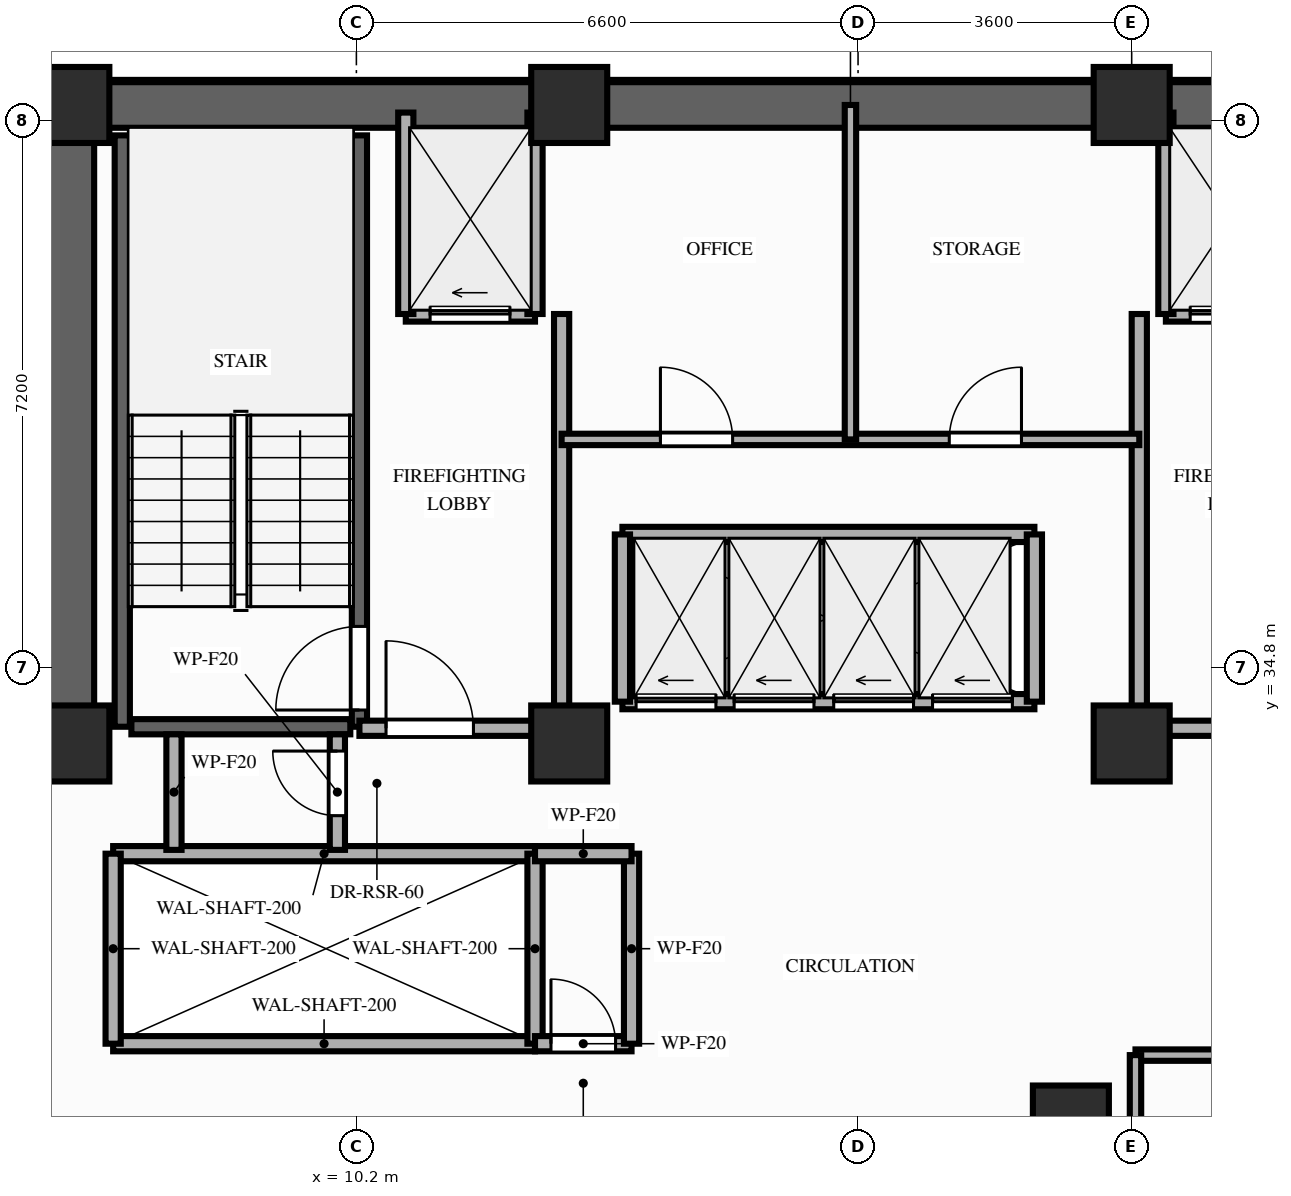
"""IFC4 building model, lengths in metres.
Left out: names, types, materials, properties, quantities, classifications, styles, units other than length and angle.
Written with IfcOpenShell. Run it as: python <this file> out.ifc"""

import sys

from ifc_helpers import new_model, si_unit, direction, frame, frame_2d, origin, origin_2d, place, context, subcontext, project, spatial, rectangle, extrude, element, fill, save


model = new_model("IFC4")
c1 = context("Model", 3, precision=1e-05, world=origin(), true_north=direction((0.0, 1.0)))
c2 = subcontext(c1, "Body", "Model", "MODEL_VIEW")
j1 = project(units=[si_unit("LENGTHUNIT", "METRE"), si_unit("PLANEANGLEUNIT", "RADIAN")], contexts=[c1])
p1 = place(None, origin())
s1 = spatial("IfcSite", under=j1, at=p1, CompositionType="ELEMENT")
p2 = place(p1, origin())
s2 = spatial("IfcBuilding", under=s1, at=p2, CompositionType="ELEMENT")
p3 = place(p2, frame((0.0, 0.0, 149.0)))
s3 = spatial("IfcBuildingStorey", under=s2, at=p3, CompositionType="ELEMENT", Elevation=149.0)
for number, where, z_axis, x_axis in (
    (1, (6.45, 33.8, 0.0), (0.0, 0.0, 1.0), (1.0, 0.0, 0.0)),
    (2, (13.0, 33.8, 0.0), (0.0, 0.0, 1.0), (1.0, 0.0, 0.0)),
    (3, (20.4, 33.8, 0.0), (0.0, 0.0, 1.0), (1.0, 0.0, 0.0)),
    (4, (6.45, 42.2, 0.0), (0.0, 0.0, 1.0), (1.0, 0.0, 0.0)),
    (5, (13.0, 42.2, 0.0), (0.0, 0.0, 1.0), (1.0, 0.0, 0.0)),
    (6, (20.4, 42.2, 0.0), (0.0, 0.0, 1.0), (1.0, 0.0, 0.0)),
    (7, (19.6, 28.8, 0.0), (0.0, 0.0, 1.0), (1.0, 0.0, 0.0)),
):
    element("IfcColumn", number, at=place(p3, frame(where, z_axis=z_axis, x_axis=x_axis)), inside=s3, PredefinedType="COLUMN", context=c2, shape_type="SweptSolid", body=[
        extrude(rectangle(XDim=1.0, YDim=1.0, at=origin_2d()), origin(), (0.0, 0.0, 1.0), 3.2),
    ])
p4 = place(p3, frame((6.45, 42.2, 0.0), z_axis=(0.0, 0.0, 1.0), x_axis=(1.0, 0.0, 0.0)))
e8 = element("IfcWall", 8, at=p4, inside=s3, PredefinedType="SHEAR", context=c2, shape_type="SweptSolid", body=[
    extrude(rectangle(XDim=20.45, YDim=0.6, at=frame_2d((10.225, 0.0))), origin(), (0.0, 0.0, 1.0), 2.96),
])
p5 = place(p3, frame((6.45, 33.8, 0.0), z_axis=(0.0, 0.0, 1.0), x_axis=(0.0, 1.0, 0.0)))
e9 = element("IfcWall", 9, at=p5, inside=s3, PredefinedType="SHEAR", context=c2, shape_type="SweptSolid", body=[
    extrude(rectangle(XDim=7.95, YDim=0.6, at=frame_2d((3.975, 0.0))), origin(), (0.0, 0.0, 1.0), 2.96),
])
p6 = place(p3, frame((7.12, 34.02, 0.0), z_axis=(0.0, 0.0, 1.0), x_axis=(0.0, 1.0, 0.0)))
e10 = element("IfcWall", 10, at=p6, inside=s3, PredefinedType="SHEAR", context=c2, shape_type="SweptSolid", body=[
    extrude(rectangle(XDim=7.78, YDim=0.2, at=frame_2d((3.89, 0.0))), origin(), (0.0, 0.0, 1.0), 2.96),
])
p7 = place(p3, frame((10.24, 34.02, 0.0), z_axis=(0.0, 0.0, 1.0), x_axis=(0.0, 1.0, 0.0)))
e11 = element("IfcWall", 11, at=p7, inside=s3, PredefinedType="SHEAR", context=c2, shape_type="SweptSolid", body=[
    extrude(rectangle(XDim=7.78, YDim=0.2, at=frame_2d((3.89, 0.0))), origin(), (0.0, 0.0, 1.0), 2.96),
])
p8 = place(p7, frame((0.22, 0.0, 0.0)))
e12 = element("IfcOpeningElement", 12, at=p8, cuts=e11, PredefinedType="OPENING", context=c2, shape_type="SweptSolid", body=[
    extrude(rectangle(XDim=1.1, YDim=2.15, at=frame_2d((0.55, 1.075))), frame((0.0, 0.11, 0.0), z_axis=(0.0, -1.0, 0.0), x_axis=(1.0, 0.0, 0.0)), (0.0, 0.0, 1.0), 0.22),
])
p9 = place(p3, frame((7.24, 34.02, 0.0), z_axis=(0.0, 0.0, 1.0), x_axis=(1.0, 0.0, 0.0)))
e13 = element("IfcWall", 13, at=p9, inside=s3, PredefinedType="SHEAR", context=c2, shape_type="SweptSolid", body=[
    extrude(rectangle(XDim=2.88, YDim=0.2, at=frame_2d((1.44, 0.0))), origin(), (0.0, 0.0, 1.0), 2.96),
])
for number, where, z_axis, x_axis in (
    (14, (7.0, 29.85, 0.0), (0.0, 0.0, 1.0), (1.0, 0.0, 0.0)),
    (15, (7.0, 32.35, 0.0), (0.0, 0.0, 1.0), (1.0, 0.0, 0.0)),
):
    element("IfcWall", number, at=place(p3, frame(where, z_axis=z_axis, x_axis=x_axis)), inside=s3, PredefinedType="MOVABLE", context=c2, shape_type="SweptSolid", body=[
        extrude(rectangle(XDim=5.55, YDim=0.2, at=frame_2d((2.775, 0.0))), origin(), (0.0, 0.0, 1.0), 2.96),
    ])
for number, where, z_axis, x_axis in (
    (16, (7.0, 29.85, 0.0), (0.0, 0.0, 1.0), (0.0, 1.0, 0.0)),
    (17, (12.55, 29.85, 0.0), (0.0, 0.0, 1.0), (0.0, 1.0, 0.0)),
):
    element("IfcWall", number, at=place(p3, frame(where, z_axis=z_axis, x_axis=x_axis)), inside=s3, PredefinedType="MOVABLE", context=c2, shape_type="SweptSolid", body=[
        extrude(rectangle(XDim=2.5, YDim=0.2, at=frame_2d((1.25, 0.0))), origin(), (0.0, 0.0, 1.0), 2.96),
    ])
p10 = place(p3, frame((10.85, 39.45, 0.0), z_axis=(0.0, 0.0, 1.0), x_axis=(1.0, 0.0, 0.0)))
e18 = element("IfcWall", 18, at=p10, inside=s3, PredefinedType="MOVABLE", context=c2, shape_type="SweptSolid", body=[
    extrude(rectangle(XDim=1.7, YDim=0.2, at=frame_2d((0.85, 0.0))), origin(), (0.0, 0.0, 1.0), 2.96),
])
p11 = place(p10, frame((0.32, 0.0, 0.0)))
e19 = element("IfcOpeningElement", 19, at=p11, cuts=e18, PredefinedType="OPENING", context=c2, shape_type="SweptSolid", body=[
    extrude(rectangle(XDim=1.05, YDim=2.15, at=frame_2d((0.525, 1.075))), frame((0.0, 0.11, 0.0), z_axis=(0.0, -1.0, 0.0), x_axis=(1.0, 0.0, 0.0)), (0.0, 0.0, 1.0), 0.22),
])
p12 = place(p3, frame((20.85, 39.45, 0.0), z_axis=(0.0, 0.0, 1.0), x_axis=(1.0, 0.0, 0.0)))
e20 = element("IfcWall", 20, at=p12, inside=s3, PredefinedType="MOVABLE", context=c2, shape_type="SweptSolid", body=[
    extrude(rectangle(XDim=1.7, YDim=0.2, at=frame_2d((0.85, 0.0))), origin(), (0.0, 0.0, 1.0), 2.96),
])
p13 = place(p12, frame((0.32, 0.0, 0.0)))
e21 = element("IfcOpeningElement", 21, at=p13, cuts=e20, PredefinedType="OPENING", context=c2, shape_type="SweptSolid", body=[
    extrude(rectangle(XDim=1.05, YDim=2.15, at=frame_2d((0.525, 1.075))), frame((0.0, 0.11, 0.0), z_axis=(0.0, -1.0, 0.0), x_axis=(1.0, 0.0, 0.0)), (0.0, 0.0, 1.0), 0.22),
])
for number, where, z_axis, x_axis in (
    (22, (10.85, 39.45, 0.0), (0.0, 0.0, 1.0), (0.0, 1.0, 0.0)),
    (23, (12.55, 39.45, 0.0), (0.0, 0.0, 1.0), (0.0, 1.0, 0.0)),
):
    element("IfcWall", number, at=place(p3, frame(where, z_axis=z_axis, x_axis=x_axis)), inside=s3, PredefinedType="MOVABLE", context=c2, shape_type="SweptSolid", body=[
        extrude(rectangle(XDim=2.65, YDim=0.2, at=frame_2d((1.325, 0.0))), origin(), (0.0, 0.0, 1.0), 2.4),
    ])
p14 = place(p3, frame((12.9, 34.0, 0.0), z_axis=(0.0, 0.0, 1.0), x_axis=(0.0, 1.0, 0.0)))
e24 = element("IfcWall", 24, at=p14, inside=s3, PredefinedType="PARTITIONING", context=c2, shape_type="SweptSolid", body=[
    extrude(rectangle(XDim=5.45, YDim=0.2, at=frame_2d((2.725, 0.0))), origin(), (0.0, 0.0, 1.0), 2.4),
])
p15 = place(p3, frame((10.24, 34.0, 0.0), z_axis=(0.0, 0.0, 1.0), x_axis=(1.0, 0.0, 0.0)))
e25 = element("IfcWall", 25, at=p15, inside=s3, PredefinedType="PARTITIONING", context=c2, shape_type="SweptSolid", body=[
    extrude(rectangle(XDim=2.66, YDim=0.2, at=frame_2d((1.33, 0.0))), origin(), (0.0, 0.0, 1.0), 2.4),
])
p16 = place(p15, frame((0.35, 0.0, 0.0)))
e26 = element("IfcOpeningElement", 26, at=p16, cuts=e25, PredefinedType="OPENING", context=c2, shape_type="SweptSolid", body=[
    extrude(rectangle(XDim=1.15, YDim=2.15, at=frame_2d((0.575, 1.075))), frame((0.0, 0.11, 0.0), z_axis=(0.0, -1.0, 0.0), x_axis=(1.0, 0.0, 0.0)), (0.0, 0.0, 1.0), 0.22),
])
p17 = place(p3, frame((20.85, 39.45, 0.0), z_axis=(0.0, 0.0, 1.0), x_axis=(0.0, 1.0, 0.0)))
e27 = element("IfcWall", 27, at=p17, inside=s3, PredefinedType="MOVABLE", context=c2, shape_type="SweptSolid", body=[
    extrude(rectangle(XDim=2.65, YDim=0.2, at=frame_2d((1.325, 0.0))), origin(), (0.0, 0.0, 1.0), 2.4),
])
p18 = place(p3, frame((20.5, 34.0, 0.0), z_axis=(0.0, 0.0, 1.0), x_axis=(0.0, 1.0, 0.0)))
e28 = element("IfcWall", 28, at=p18, inside=s3, PredefinedType="PARTITIONING", context=c2, shape_type="SweptSolid", body=[
    extrude(rectangle(XDim=5.45, YDim=0.2, at=frame_2d((2.725, 0.0))), origin(), (0.0, 0.0, 1.0), 2.4),
])
p19 = place(p3, frame((20.5, 34.0, 0.0), z_axis=(0.0, 0.0, 1.0), x_axis=(1.0, 0.0, 0.0)))
e29 = element("IfcWall", 29, at=p19, inside=s3, PredefinedType="PARTITIONING", context=c2, shape_type="SweptSolid", body=[
    extrude(rectangle(XDim=2.6, YDim=0.2, at=frame_2d((1.3, 0.0))), origin(), (0.0, 0.0, 1.0), 2.4),
])
p20 = place(p19, frame((1.05, 0.0, 0.0)))
e30 = element("IfcOpeningElement", 30, at=p20, cuts=e29, PredefinedType="OPENING", context=c2, shape_type="SweptSolid", body=[
    extrude(rectangle(XDim=1.15, YDim=2.15, at=frame_2d((0.575, 1.075))), frame((0.0, 0.11, 0.0), z_axis=(0.0, -1.0, 0.0), x_axis=(1.0, 0.0, 0.0)), (0.0, 0.0, 1.0), 0.22),
])
p21 = place(p3, frame((12.55, 29.85, 0.0), z_axis=(0.0, 0.0, 1.0), x_axis=(1.0, 0.0, 0.0)))
e31 = element("IfcWall", 31, at=p21, inside=s3, PredefinedType="PARTITIONING", context=c2, shape_type="SweptSolid", body=[
    extrude(rectangle(XDim=1.27, YDim=0.2, at=frame_2d((0.635, 0.0))), origin(), (0.0, 0.0, 1.0), 2.96),
])
p22 = place(p21, frame((0.21, 0.0, 0.0)))
e32 = element("IfcOpeningElement", 32, at=p22, cuts=e31, PredefinedType="OPENING", context=c2, shape_type="SweptSolid", body=[
    extrude(rectangle(XDim=0.85, YDim=2.05, at=frame_2d((0.425, 1.025))), frame((0.0, 0.11, 0.0), z_axis=(0.0, -1.0, 0.0), x_axis=(1.0, 0.0, 0.0)), (0.0, 0.0, 1.0), 0.22),
])
p23 = place(p3, frame((13.82, 29.85, 0.0), z_axis=(0.0, 0.0, 1.0), x_axis=(0.0, 1.0, 0.0)))
e33 = element("IfcWall", 33, at=p23, inside=s3, PredefinedType="PARTITIONING", context=c2, shape_type="SweptSolid", body=[
    extrude(rectangle(XDim=2.5, YDim=0.2, at=frame_2d((1.25, 0.0))), origin(), (0.0, 0.0, 1.0), 2.96),
])
p24 = place(p3, frame((12.55, 32.35, 0.0), z_axis=(0.0, 0.0, 1.0), x_axis=(1.0, 0.0, 0.0)))
e34 = element("IfcWall", 34, at=p24, inside=s3, PredefinedType="PARTITIONING", context=c2, shape_type="SweptSolid", body=[
    extrude(rectangle(XDim=1.27, YDim=0.2, at=frame_2d((0.635, 0.0))), origin(), (0.0, 0.0, 1.0), 2.96),
])
p25 = place(p3, frame((7.8, 32.4, 0.0), z_axis=(0.0, 0.0, 1.0), x_axis=(0.0, 1.0, 0.0)))
e35 = element("IfcWall", 35, at=p25, inside=s3, PredefinedType="PARTITIONING", context=c2, shape_type="SweptSolid", body=[
    extrude(rectangle(XDim=1.52, YDim=0.2, at=frame_2d((0.76, 0.0))), origin(), (0.0, 0.0, 1.0), 2.4),
])
p26 = place(p3, frame((9.95, 32.4, 0.0), z_axis=(0.0, 0.0, 1.0), x_axis=(0.0, 1.0, 0.0)))
e36 = element("IfcWall", 36, at=p26, inside=s3, PredefinedType="PARTITIONING", context=c2, shape_type="SweptSolid", body=[
    extrude(rectangle(XDim=1.52, YDim=0.2, at=frame_2d((0.76, 0.0))), origin(), (0.0, 0.0, 1.0), 2.4),
])
p27 = place(p26, frame((0.45, 0.0, 0.0)))
e37 = element("IfcOpeningElement", 37, at=p27, cuts=e36, PredefinedType="OPENING", context=c2, shape_type="SweptSolid", body=[
    extrude(rectangle(XDim=0.85, YDim=2.05, at=frame_2d((0.425, 1.025))), frame((0.0, 0.11, 0.0), z_axis=(0.0, -1.0, 0.0), x_axis=(1.0, 0.0, 0.0)), (0.0, 0.0, 1.0), 0.22),
])
p28 = place(p3, frame((12.9, 37.8, 0.0), z_axis=(0.0, 0.0, 1.0), x_axis=(1.0, 0.0, 0.0)))
e38 = element("IfcWall", 38, at=p28, inside=s3, PredefinedType="PARTITIONING", context=c2, shape_type="SweptSolid", body=[
    extrude(rectangle(XDim=7.6, YDim=0.15, at=frame_2d((3.8, 0.0))), origin(), (0.0, 0.0, 1.0), 2.96),
])
p29 = place(p28, frame((1.3, 0.0, 0.0)))
e39 = element("IfcOpeningElement", 39, at=p29, cuts=e38, PredefinedType="OPENING", context=c2, shape_type="SweptSolid", body=[
    extrude(rectangle(XDim=0.95, YDim=2.15, at=frame_2d((0.475, 1.075))), frame((0.0, 0.085, 0.0), z_axis=(0.0, -1.0, 0.0), x_axis=(1.0, 0.0, 0.0)), (0.0, 0.0, 1.0), 0.17),
])
p30 = place(p28, frame((5.1, 0.0, 0.0)))
e40 = element("IfcOpeningElement", 40, at=p30, cuts=e38, PredefinedType="OPENING", context=c2, shape_type="SweptSolid", body=[
    extrude(rectangle(XDim=0.95, YDim=2.15, at=frame_2d((0.475, 1.075))), frame((0.0, 0.085, 0.0), z_axis=(0.0, -1.0, 0.0), x_axis=(1.0, 0.0, 0.0)), (0.0, 0.0, 1.0), 0.17),
])
p31 = place(p3, frame((16.7, 37.8, 0.0), z_axis=(0.0, 0.0, 1.0), x_axis=(0.0, 1.0, 0.0)))
e41 = element("IfcWall", 41, at=p31, inside=s3, PredefinedType="PARTITIONING", context=c2, shape_type="SweptSolid", body=[
    extrude(rectangle(XDim=4.4, YDim=0.15, at=frame_2d((2.2, 0.0))), origin(), (0.0, 0.0, 1.0), 2.4),
])
p32 = place(p3, frame((13.7, 34.35, 0.0), z_axis=(0.0, 0.0, 1.0), x_axis=(1.0, 0.0, 0.0)))
e42 = element("IfcWall", 42, at=p32, inside=s3, PredefinedType="MOVABLE", context=c2, shape_type="SweptSolid", body=[
    extrude(rectangle(XDim=5.42, YDim=0.2, at=frame_2d((2.71, 0.0))), origin(), (0.0, 0.0, 1.0), 2.96),
])
p33 = place(p32, frame((0.18, 0.0, 0.0)))
e43 = element("IfcOpeningElement", 43, at=p33, cuts=e42, PredefinedType="OPENING", context=c2, shape_type="SweptSolid", body=[
    extrude(rectangle(XDim=1.05, YDim=2.15, at=frame_2d((0.525, 1.075))), frame((0.0, 0.11, 0.0), z_axis=(0.0, -1.0, 0.0), x_axis=(1.0, 0.0, 0.0)), (0.0, 0.0, 1.0), 0.22),
])
p34 = place(p32, frame((1.47, 0.0, 0.0)))
e44 = element("IfcOpeningElement", 44, at=p34, cuts=e42, PredefinedType="OPENING", context=c2, shape_type="SweptSolid", body=[
    extrude(rectangle(XDim=1.05, YDim=2.15, at=frame_2d((0.525, 1.075))), frame((0.0, 0.11, 0.0), z_axis=(0.0, -1.0, 0.0), x_axis=(1.0, 0.0, 0.0)), (0.0, 0.0, 1.0), 0.22),
])
p35 = place(p32, frame((2.78, 0.0, 0.0)))
e45 = element("IfcOpeningElement", 45, at=p35, cuts=e42, PredefinedType="OPENING", context=c2, shape_type="SweptSolid", body=[
    extrude(rectangle(XDim=1.05, YDim=2.15, at=frame_2d((0.525, 1.075))), frame((0.0, 0.11, 0.0), z_axis=(0.0, -1.0, 0.0), x_axis=(1.0, 0.0, 0.0)), (0.0, 0.0, 1.0), 0.22),
])
p36 = place(p32, frame((4.08, 0.0, 0.0)))
e46 = element("IfcOpeningElement", 46, at=p36, cuts=e42, PredefinedType="OPENING", context=c2, shape_type="SweptSolid", body=[
    extrude(rectangle(XDim=1.05, YDim=2.15, at=frame_2d((0.525, 1.075))), frame((0.0, 0.11, 0.0), z_axis=(0.0, -1.0, 0.0), x_axis=(1.0, 0.0, 0.0)), (0.0, 0.0, 1.0), 0.22),
])
p37 = place(p3, frame((13.7, 36.55, 0.0), z_axis=(0.0, 0.0, 1.0), x_axis=(1.0, 0.0, 0.0)))
e47 = element("IfcWall", 47, at=p37, inside=s3, PredefinedType="MOVABLE", context=c2, shape_type="SweptSolid", body=[
    extrude(rectangle(XDim=5.42, YDim=0.2, at=frame_2d((2.71, 0.0))), origin(), (0.0, 0.0, 1.0), 2.96),
])
for number, where, z_axis, x_axis in (
    (48, (13.7, 34.35, 0.0), (0.0, 0.0, 1.0), (0.0, 1.0, 0.0)),
    (49, (19.12, 34.35, 0.0), (0.0, 0.0, 1.0), (0.0, 1.0, 0.0)),
):
    element("IfcWall", number, at=place(p3, frame(where, z_axis=z_axis, x_axis=x_axis)), inside=s3, PredefinedType="MOVABLE", context=c2, shape_type="SweptSolid", body=[
        extrude(rectangle(XDim=2.2, YDim=0.2, at=frame_2d((1.1, 0.0))), origin(), (0.0, 0.0, 1.0), 2.96),
    ])
p38 = place(p3, frame((20.45, 29.7, 0.0), z_axis=(0.0, 0.0, 1.0), x_axis=(1.0, 0.0, 0.0)))
e50 = element("IfcWall", 50, at=p38, inside=s3, PredefinedType="PARTITIONING", context=c2, shape_type="SweptSolid", body=[
    extrude(rectangle(XDim=6.7, YDim=0.15, at=frame_2d((3.35, 0.0))), origin(), (0.0, 0.0, 1.0), 2.96),
])
p39 = place(p38, frame((2.8, 0.0, 0.0)))
e51 = element("IfcOpeningElement", 51, at=p39, cuts=e50, PredefinedType="OPENING", context=c2, shape_type="SweptSolid", body=[
    extrude(rectangle(XDim=0.95, YDim=2.15, at=frame_2d((0.475, 1.075))), frame((0.0, 0.085, 0.0), z_axis=(0.0, -1.0, 0.0), x_axis=(1.0, 0.0, 0.0)), (0.0, 0.0, 1.0), 0.17),
])
p40 = place(p3, frame((20.45, 26.75, 0.0), z_axis=(0.0, 0.0, 1.0), x_axis=(0.0, 1.0, 0.0)))
e52 = element("IfcWall", 52, at=p40, inside=s3, PredefinedType="PARTITIONING", context=c2, shape_type="SweptSolid", body=[
    extrude(rectangle(XDim=2.95, YDim=0.15, at=frame_2d((1.475, 0.0))), origin(), (0.0, 0.0, 1.0), 2.4),
])
p41 = place(p8, origin())
e53 = element("IfcDoor", 53, at=p41, inside=s3, OperationType="SINGLE_SWING_LEFT", PredefinedType="DOOR", context=c2, shape_type="SweptSolid", body=[
    extrude(rectangle(XDim=1.1, YDim=2.15, at=frame_2d((0.55, 1.075))), frame((0.0, 0.025, 0.0), z_axis=(0.0, -1.0, 0.0), x_axis=(1.0, 0.0, 0.0)), (0.0, 0.0, 1.0), 0.05),
])
fill(e12, e53)
p42 = place(p11, origin())
e54 = element("IfcDoor", 54, at=p42, inside=s3, OperationType="SLIDING_TO_LEFT", PredefinedType="DOOR", context=c2, shape_type="SweptSolid", body=[
    extrude(rectangle(XDim=1.05, YDim=2.15, at=frame_2d((0.525, 1.075))), frame((0.0, 0.025, 0.0), z_axis=(0.0, -1.0, 0.0), x_axis=(1.0, 0.0, 0.0)), (0.0, 0.0, 1.0), 0.05),
])
fill(e19, e54)
p43 = place(p13, origin())
e55 = element("IfcDoor", 55, at=p43, inside=s3, OperationType="SLIDING_TO_LEFT", PredefinedType="DOOR", context=c2, shape_type="SweptSolid", body=[
    extrude(rectangle(XDim=1.05, YDim=2.15, at=frame_2d((0.525, 1.075))), frame((0.0, 0.025, 0.0), z_axis=(0.0, -1.0, 0.0), x_axis=(1.0, 0.0, 0.0)), (0.0, 0.0, 1.0), 0.05),
])
fill(e21, e55)
p44 = place(p16, origin())
e56 = element("IfcDoor", 56, at=p44, inside=s3, OperationType="SINGLE_SWING_LEFT", PredefinedType="DOOR", context=c2, shape_type="SweptSolid", body=[
    extrude(rectangle(XDim=1.15, YDim=2.15, at=frame_2d((0.575, 1.075))), frame((0.0, 0.025, 0.0), z_axis=(0.0, -1.0, 0.0), x_axis=(1.0, 0.0, 0.0)), (0.0, 0.0, 1.0), 0.05),
])
fill(e26, e56)
p45 = place(p22, origin())
e57 = element("IfcDoor", 57, at=p45, inside=s3, OperationType="SINGLE_SWING_LEFT", PredefinedType="DOOR", context=c2, shape_type="SweptSolid", body=[
    extrude(rectangle(XDim=0.85, YDim=2.05, at=frame_2d((0.425, 1.025))), frame((0.0, 0.025, 0.0), z_axis=(0.0, -1.0, 0.0), x_axis=(1.0, 0.0, 0.0)), (0.0, 0.0, 1.0), 0.05),
])
fill(e32, e57)
p46 = place(p27, origin())
e58 = element("IfcDoor", 58, at=p46, inside=s3, OperationType="SINGLE_SWING_RIGHT", PredefinedType="DOOR", context=c2, shape_type="SweptSolid", body=[
    extrude(rectangle(XDim=0.85, YDim=2.05, at=frame_2d((0.425, 1.025))), frame((0.0, 0.025, 0.0), z_axis=(0.0, -1.0, 0.0), x_axis=(1.0, 0.0, 0.0)), (0.0, 0.0, 1.0), 0.05),
])
fill(e37, e58)
p47 = place(p29, origin())
e59 = element("IfcDoor", 59, at=p47, inside=s3, OperationType="SINGLE_SWING_LEFT", PredefinedType="DOOR", context=c2, shape_type="SweptSolid", body=[
    extrude(rectangle(XDim=0.95, YDim=2.15, at=frame_2d((0.475, 1.075))), frame((0.0, 0.025, 0.0), z_axis=(0.0, -1.0, 0.0), x_axis=(1.0, 0.0, 0.0)), (0.0, 0.0, 1.0), 0.05),
])
fill(e39, e59)
p48 = place(p30, origin())
e60 = element("IfcDoor", 60, at=p48, inside=s3, OperationType="SINGLE_SWING_RIGHT", PredefinedType="DOOR", context=c2, shape_type="SweptSolid", body=[
    extrude(rectangle(XDim=0.95, YDim=2.15, at=frame_2d((0.475, 1.075))), frame((0.0, 0.025, 0.0), z_axis=(0.0, -1.0, 0.0), x_axis=(1.0, 0.0, 0.0)), (0.0, 0.0, 1.0), 0.05),
])
fill(e40, e60)
p49 = place(p33, origin())
e61 = element("IfcDoor", 61, at=p49, inside=s3, OperationType="SLIDING_TO_LEFT", PredefinedType="DOOR", context=c2, shape_type="SweptSolid", body=[
    extrude(rectangle(XDim=1.05, YDim=2.15, at=frame_2d((0.525, 1.075))), frame((0.0, 0.025, 0.0), z_axis=(0.0, -1.0, 0.0), x_axis=(1.0, 0.0, 0.0)), (0.0, 0.0, 1.0), 0.05),
])
fill(e43, e61)
p50 = place(p34, origin())
e62 = element("IfcDoor", 62, at=p50, inside=s3, OperationType="SLIDING_TO_LEFT", PredefinedType="DOOR", context=c2, shape_type="SweptSolid", body=[
    extrude(rectangle(XDim=1.05, YDim=2.15, at=frame_2d((0.525, 1.075))), frame((0.0, 0.025, 0.0), z_axis=(0.0, -1.0, 0.0), x_axis=(1.0, 0.0, 0.0)), (0.0, 0.0, 1.0), 0.05),
])
fill(e44, e62)
p51 = place(p35, origin())
e63 = element("IfcDoor", 63, at=p51, inside=s3, OperationType="SLIDING_TO_LEFT", PredefinedType="DOOR", context=c2, shape_type="SweptSolid", body=[
    extrude(rectangle(XDim=1.05, YDim=2.15, at=frame_2d((0.525, 1.075))), frame((0.0, 0.025, 0.0), z_axis=(0.0, -1.0, 0.0), x_axis=(1.0, 0.0, 0.0)), (0.0, 0.0, 1.0), 0.05),
])
fill(e45, e63)
p52 = place(p36, origin())
e64 = element("IfcDoor", 64, at=p52, inside=s3, OperationType="SLIDING_TO_LEFT", PredefinedType="DOOR", context=c2, shape_type="SweptSolid", body=[
    extrude(rectangle(XDim=1.05, YDim=2.15, at=frame_2d((0.525, 1.075))), frame((0.0, 0.025, 0.0), z_axis=(0.0, -1.0, 0.0), x_axis=(1.0, 0.0, 0.0)), (0.0, 0.0, 1.0), 0.05),
])
fill(e46, e64)
save(model, sys.argv[1])
